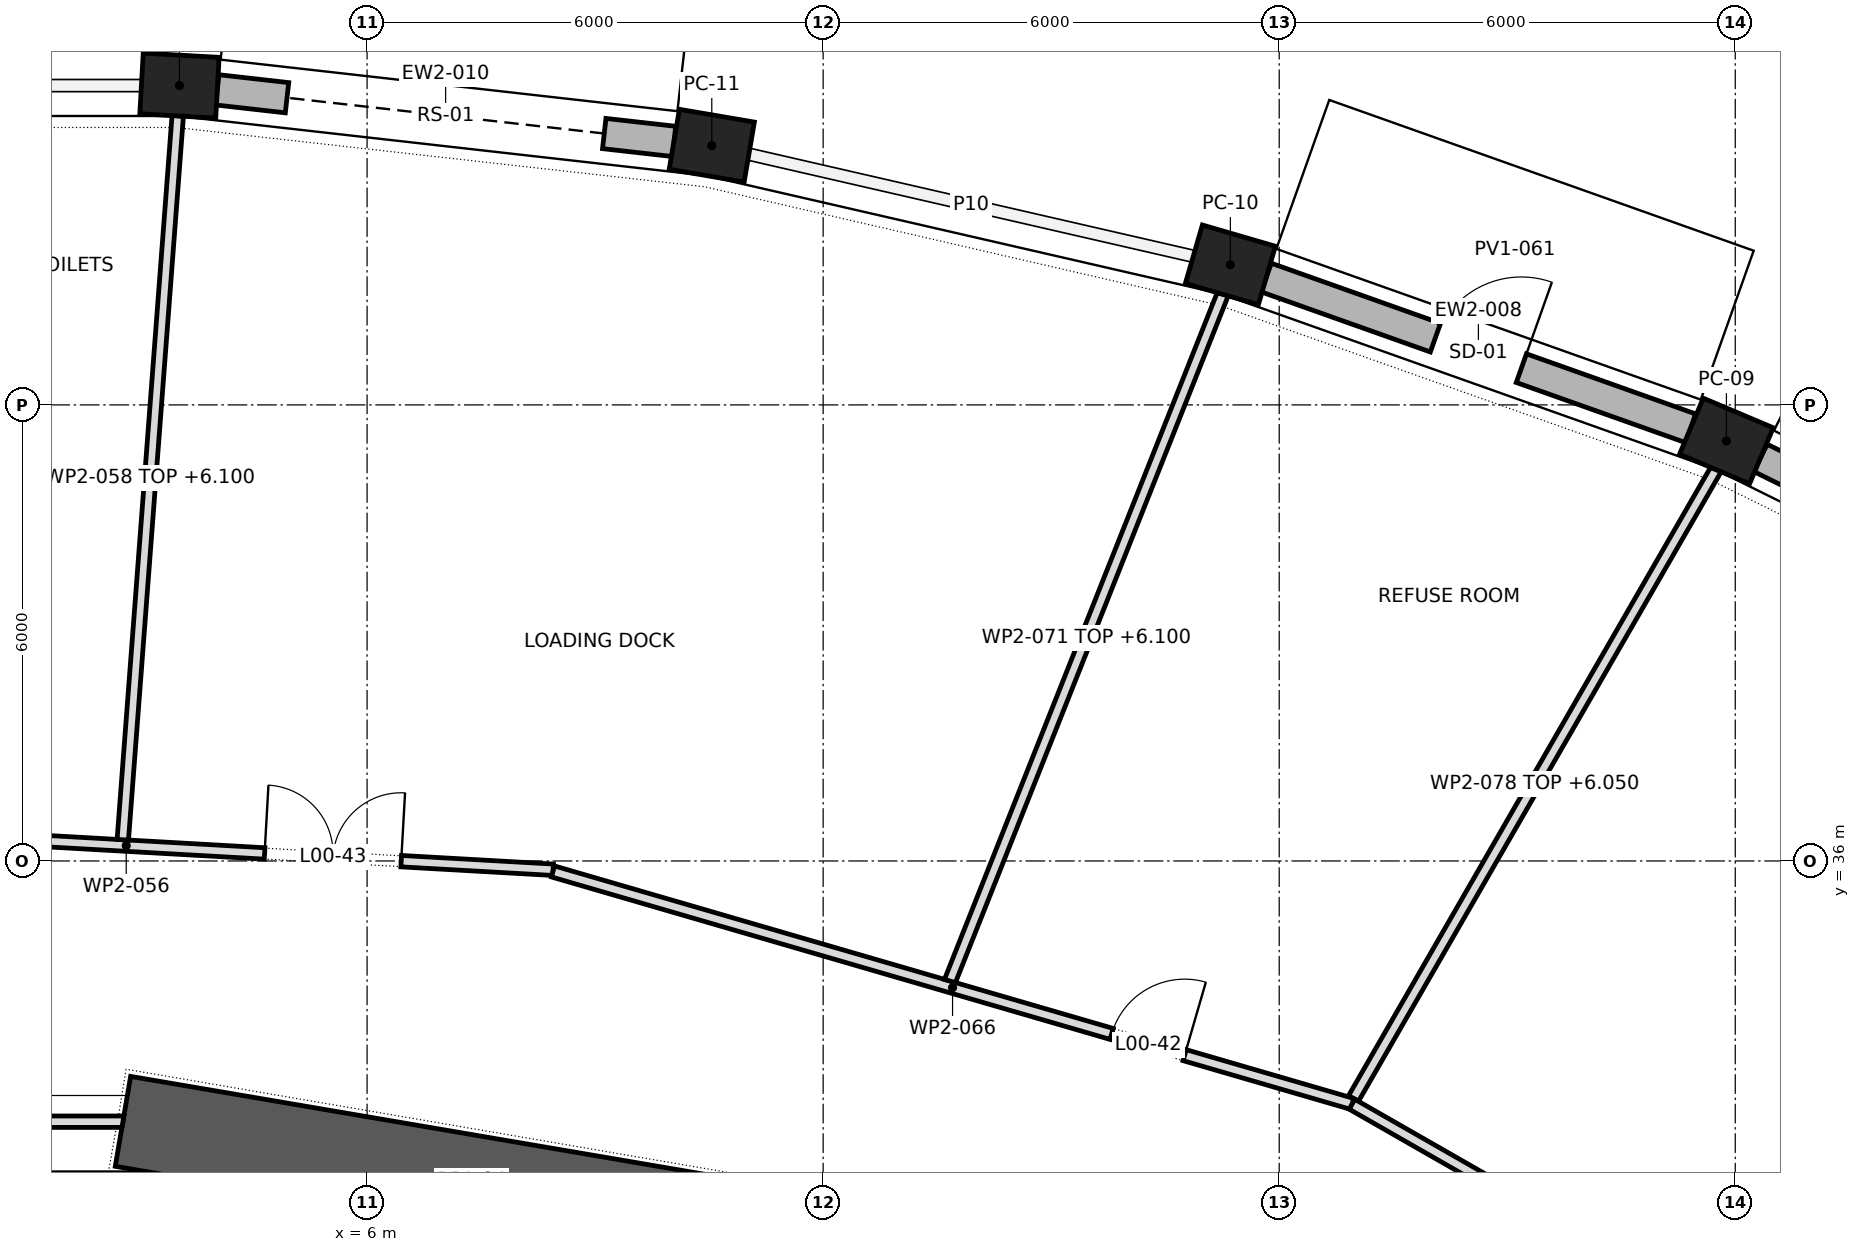
"""IFC4 building model, lengths in metres.
Left out: names, types, materials, properties, quantities, classifications, styles, units other than length and angle.
Written with IfcOpenShell. Run it as: python <this file> out.ifc"""

import sys

from ifc_helpers import new_model, si_unit, direction, frame, frame_2d, origin, origin_2d, place, context, subcontext, project, spatial, polyline, rectangle, outline, extrude, element, fill, save


model = new_model("IFC4")
c1 = context("Model", 3, precision=1e-05, world=origin(), true_north=direction((0.0, 1.0)))
c2 = subcontext(c1, "Body", "Model", "MODEL_VIEW")
j1 = project(units=[si_unit("LENGTHUNIT", "METRE"), si_unit("PLANEANGLEUNIT", "RADIAN")], contexts=[c1])
p1 = place(None, origin())
s1 = spatial("IfcSite", under=j1, at=p1, CompositionType="ELEMENT")
p2 = place(p1, origin())
s2 = spatial("IfcBuilding", under=s1, at=p2, CompositionType="ELEMENT")
p3 = place(p2, origin())
s3 = spatial("IfcBuildingStorey", under=s2, at=p3, CompositionType="ELEMENT", Elevation=0.0)
for number, where, z_axis, x_axis in (
    (1, (23.884, 41.525, 0.0), (0.0, 0.0, 1.0), (-0.921, 0.389, 0.0)),
    (2, (17.358, 43.843, 0.0), (0.0, 0.0, 1.0), (-0.96, 0.279, 0.0)),
    (3, (10.535, 45.41, 0.0), (0.0, 0.0, 1.0), (-0.986, 0.168, 0.0)),
    (4, (3.532, 46.201, 0.0), (0.0, 0.0, 1.0), (-0.998, 0.056, 0.0)),
):
    element("IfcColumn", number, at=place(p3, frame(where, z_axis=z_axis, x_axis=x_axis)), inside=s3, PredefinedType="COLUMN", context=c2, shape_type="SweptSolid", body=[
        extrude(rectangle(XDim=1.0, YDim=0.8, at=origin_2d()), origin(), (0.0, 0.0, 1.0), 7.0),
    ])
p4 = place(p3, frame((11.967, 31.009, 0.0), z_axis=(0.0, 0.0, 1.0), x_axis=(-0.985776286846, 0.168062822456, 0.0)))
e5 = element("IfcWall", 5, at=p4, inside=s3, PredefinedType="SHEAR", context=c2, shape_type="SweptSolid", body=[
    extrude(rectangle(XDim=9.312, YDim=1.2, at=frame_2d((4.656, 0.0))), origin(), (0.0, 0.0, 1.0), 7.0),
])
p5 = place(p3, frame((29.553, 38.719, 0.0), z_axis=(0.0, 0.0, 1.0), x_axis=(-0.896188687727, 0.443673118399, 0.0)))
e6 = element("IfcWall", 6, at=p5, inside=s3, PredefinedType="STANDARD", context=c2, shape_type="SweptSolid", body=[
    extrude(rectangle(XDim=5.826, YDim=0.4, at=frame_2d((2.913, 0.0))), origin(), (0.0, 0.0, 1.0), 6.2),
])
p6 = place(p5, frame((1.113, 0.0, 0.0)))
e7 = element("IfcOpeningElement", 7, at=p6, cuts=e6, PredefinedType="OPENING", context=c2, shape_type="SweptSolid", body=[
    extrude(rectangle(XDim=3.6, YDim=3.0, at=frame_2d((1.8, 1.5))), frame((0.0, 0.212, 0.0), z_axis=(0.0, -1.0, 0.0), x_axis=(1.0, 0.0, 0.0)), (0.0, 0.0, 1.0), 0.424),
])
p7 = place(p5, frame((1.113, 0.0, 3.45)))
e8 = element("IfcOpeningElement", 8, at=p7, cuts=e6, PredefinedType="OPENING", context=c2, shape_type="SweptSolid", body=[
    extrude(rectangle(XDim=3.6, YDim=2.25, at=frame_2d((1.8, 1.125))), frame((0.0, 0.212, 0.0), z_axis=(0.0, -1.0, 0.0), x_axis=(1.0, 0.0, 0.0)), (0.0, 0.0, 1.0), 0.424),
])
p8 = place(p3, frame((23.412, 41.692, 0.0), z_axis=(0.0, 0.0, 1.0), x_axis=(-0.942325911458, 0.334696693431, 0.0)))
e9 = element("IfcWall", 9, at=p8, inside=s3, PredefinedType="STANDARD", context=c2, shape_type="SweptSolid", body=[
    extrude(rectangle(XDim=5.925, YDim=0.4, at=frame_2d((2.963, 0.0))), origin(), (0.0, 0.0, 1.0), 6.2),
])
p9 = place(p8, frame((2.363, 0.0, 0.0)))
e10 = element("IfcOpeningElement", 10, at=p9, cuts=e9, PredefinedType="OPENING", context=c2, shape_type="SweptSolid", body=[
    extrude(rectangle(XDim=1.2, YDim=2.4, at=frame_2d((0.6, 1.2))), frame((0.0, 0.212, 0.0), z_axis=(0.0, -1.0, 0.0), x_axis=(1.0, 0.0, 0.0)), (0.0, 0.0, 1.0), 0.424),
])
p10 = place(p3, frame((10.038, 45.467, 0.0), z_axis=(0.0, 0.0, 1.0), x_axis=(-0.993691731831, 0.112146074793, 0.0)))
e11 = element("IfcWall", 11, at=p10, inside=s3, PredefinedType="STANDARD", context=c2, shape_type="SweptSolid", body=[
    extrude(rectangle(XDim=6.048, YDim=0.4, at=frame_2d((3.024, 0.0))), origin(), (0.0, 0.0, 1.0), 6.2),
])
p11 = place(p10, frame((0.924, 0.0, 0.0)))
e12 = element("IfcOpeningElement", 12, at=p11, cuts=e11, PredefinedType="OPENING", context=c2, shape_type="SweptSolid", body=[
    extrude(rectangle(XDim=4.2, YDim=4.5, at=frame_2d((2.1, 2.25))), frame((0.0, 0.212, 0.0), z_axis=(0.0, -1.0, 0.0), x_axis=(1.0, 0.0, 0.0)), (0.0, 0.0, 1.0), 0.424),
])
p12 = place(p3, frame((-2.785, 36.519, 0.0), z_axis=(0.0, 0.0, 1.0), x_axis=(0.99840694737, -0.0564231109, 0.0)))
e13 = element("IfcWall", 13, at=p12, inside=s3, PredefinedType="PARTITIONING", context=c2, shape_type="SweptSolid", body=[
    extrude(rectangle(XDim=11.25, YDim=0.15, at=frame_2d((5.625, 0.0))), origin(), (0.0, 0.0, 1.0), 6.65),
])
p13 = place(p12, frame((7.448, 0.0, 0.0)))
e14 = element("IfcOpeningElement", 14, at=p13, cuts=e13, PredefinedType="OPENING", context=c2, shape_type="SweptSolid", body=[
    extrude(rectangle(XDim=1.8, YDim=2.1, at=frame_2d((0.9, 1.05))), frame((0.0, 0.087, 0.0), z_axis=(0.0, -1.0, 0.0), x_axis=(1.0, 0.0, 0.0)), (0.0, 0.0, 1.0), 0.174),
])
p14 = place(p12, frame((2.295, 0.0, 0.0)))
e15 = element("IfcOpeningElement", 15, at=p14, cuts=e13, PredefinedType="OPENING", context=c2, shape_type="SweptSolid", body=[
    extrude(rectangle(XDim=1.0, YDim=2.1, at=frame_2d((0.5, 1.05))), frame((0.0, 0.087, 0.0), z_axis=(0.0, -1.0, 0.0), x_axis=(1.0, 0.0, 0.0)), (0.0, 0.0, 1.0), 0.174),
])
p15 = place(p3, frame((-2.788, 32.57, 0.0), z_axis=(0.0, 0.0, 1.0), x_axis=(1.0, 0.0, 0.0)))
e16 = element("IfcWall", 16, at=p15, inside=s3, PredefinedType="PARTITIONING", context=c2, shape_type="SweptSolid", body=[
    extrude(outline(polyline([(0.013, -0.075), (5.563, -0.075), (5.589, 0.075), (-0.013, 0.075), (0.013, -0.075)])), origin(), (0.0, 0.0, 1.0), 6.1),
])
p16 = place(p15, frame((1.588, 0.0, 0.0)))
e17 = element("IfcOpeningElement", 17, at=p16, cuts=e16, PredefinedType="OPENING", context=c2, shape_type="SweptSolid", body=[
    extrude(rectangle(XDim=2.4, YDim=2.1, at=frame_2d((1.2, 1.05))), frame((0.0, 0.087, 0.0), z_axis=(0.0, -1.0, 0.0), x_axis=(1.0, 0.0, 0.0)), (0.0, 0.0, 1.0), 0.174),
])
p17 = place(p3, frame((2.786, 36.279, 0.0), z_axis=(0.0, 0.0, 1.0), x_axis=(0.07568782988, 0.997131562236, 0.0)))
e18 = element("IfcWall", 18, at=p17, inside=s3, PredefinedType="PARTITIONING", context=c2, shape_type="SweptSolid", body=[
    extrude(rectangle(XDim=9.551, YDim=0.15, at=frame_2d((4.775, 0.0))), origin(), (0.0, 0.0, 1.0), 6.1),
])
p18 = place(p3, frame((8.446, 35.862, 0.0), z_axis=(0.0, 0.0, 1.0), x_axis=(0.96020899529, -0.27928244729, 0.0)))
e19 = element("IfcWall", 19, at=p18, inside=s3, PredefinedType="PARTITIONING", context=c2, shape_type="SweptSolid", body=[
    extrude(rectangle(XDim=10.95, YDim=0.15, at=frame_2d((5.475, 0.0))), origin(), (0.0, 0.0, 1.0), 6.65),
])
p19 = place(p18, frame((7.655, 0.0, 0.0)))
e20 = element("IfcOpeningElement", 20, at=p19, cuts=e19, PredefinedType="OPENING", context=c2, shape_type="SweptSolid", body=[
    extrude(rectangle(XDim=1.0, YDim=2.1, at=frame_2d((0.5, 1.05))), frame((0.0, 0.087, 0.0), z_axis=(0.0, -1.0, 0.0), x_axis=(1.0, 0.0, 0.0)), (0.0, 0.0, 1.0), 0.174),
])
p20 = place(p3, frame((13.668, 34.421, 0.0), z_axis=(0.0, 0.0, 1.0), x_axis=(0.369116523782, 0.929383124374, 0.0)))
e21 = element("IfcWall", 21, at=p20, inside=s3, PredefinedType="PARTITIONING", context=c2, shape_type="SweptSolid", body=[
    extrude(outline(polyline([(0.007, -0.075), (9.729, -0.075), (9.715, 0.075), (-0.007, 0.075), (0.007, -0.075)])), origin(), (0.0, 0.0, 1.0), 6.1),
])
p21 = place(p3, frame((18.978, 32.876, 0.0), z_axis=(0.0, 0.0, 1.0), x_axis=(0.499216965882, 0.866477016992, 0.0)))
e22 = element("IfcWall", 22, at=p21, inside=s3, PredefinedType="PARTITIONING", context=c2, shape_type="SweptSolid", body=[
    extrude(outline(polyline([(0.0, -0.075), (9.558, -0.075), (9.539, 0.075), (0.0, 0.075), (0.0, -0.075)])), origin(), (0.0, 0.0, 1.0), 6.05),
])
p22 = place(p3, frame((18.958, 32.8, 0.0), z_axis=(0.0, 0.0, 1.0), x_axis=(0.867958465669, -0.496636790697, 0.0)))
e23 = element("IfcWall", 23, at=p22, inside=s3, PredefinedType="PARTITIONING", context=c2, shape_type="SweptSolid", body=[
    extrude(rectangle(XDim=10.772, YDim=0.15, at=frame_2d((5.386, 0.0))), origin(), (0.0, 0.0, 1.0), 6.65),
])
p23 = place(p22, frame((4.125, 0.0, 0.0)))
e24 = element("IfcOpeningElement", 24, at=p23, cuts=e23, PredefinedType="OPENING", context=c2, shape_type="SweptSolid", body=[
    extrude(rectangle(XDim=2.4, YDim=2.1, at=frame_2d((1.2, 1.05))), frame((0.0, 0.087, 0.0), z_axis=(0.0, -1.0, 0.0), x_axis=(1.0, 0.0, 0.0)), (0.0, 0.0, 1.0), 0.174),
])
p24 = place(p9, frame((1.2, 0.0, 0.0), z_axis=(0.0, 0.0, 1.0), x_axis=(-1.0, 0.0, 0.0)))
e25 = element("IfcDoor", 25, at=p24, inside=s3, OperationType="SINGLE_SWING_LEFT", PredefinedType="DOOR", context=c2, shape_type="SweptSolid", body=[
    extrude(rectangle(XDim=1.2, YDim=2.4, at=frame_2d((0.6, 1.2))), frame((0.0, 0.025, 0.0), z_axis=(0.0, -1.0, 0.0), x_axis=(1.0, 0.0, 0.0)), (0.0, 0.0, 1.0), 0.05),
])
fill(e10, e25)
p25 = place(p11, frame((4.2, 0.0, 0.0), z_axis=(0.0, 0.0, 1.0), x_axis=(-1.0, 0.0, 0.0)))
e26 = element("IfcDoor", 26, at=p25, inside=s3, OperationType="ROLLINGUP", PredefinedType="GATE", context=c2, shape_type="SweptSolid", body=[
    extrude(rectangle(XDim=4.2, YDim=4.5, at=frame_2d((2.1, 2.25))), frame((0.0, 0.025, 0.0), z_axis=(0.0, -1.0, 0.0), x_axis=(1.0, 0.0, 0.0)), (0.0, 0.0, 1.0), 0.05),
])
fill(e12, e26)
p26 = place(p19, origin())
e27 = element("IfcDoor", 27, at=p26, inside=s3, OperationType="SINGLE_SWING_LEFT", PredefinedType="DOOR", context=c2, shape_type="SweptSolid", body=[
    extrude(rectangle(XDim=1.0, YDim=2.1, at=frame_2d((0.5, 1.05))), frame((0.0, 0.025, 0.0), z_axis=(0.0, -1.0, 0.0), x_axis=(1.0, 0.0, 0.0)), (0.0, 0.0, 1.0), 0.05),
])
fill(e20, e27)
p27 = place(p13, origin())
e28 = element("IfcDoor", 28, at=p27, inside=s3, OperationType="DOUBLE_DOOR_SINGLE_SWING", PredefinedType="DOOR", context=c2, shape_type="SweptSolid", body=[
    extrude(rectangle(XDim=1.8, YDim=2.1, at=frame_2d((0.9, 1.05))), frame((0.0, 0.025, 0.0), z_axis=(0.0, -1.0, 0.0), x_axis=(1.0, 0.0, 0.0)), (0.0, 0.0, 1.0), 0.05),
])
fill(e14, e28)
save(model, sys.argv[1])
